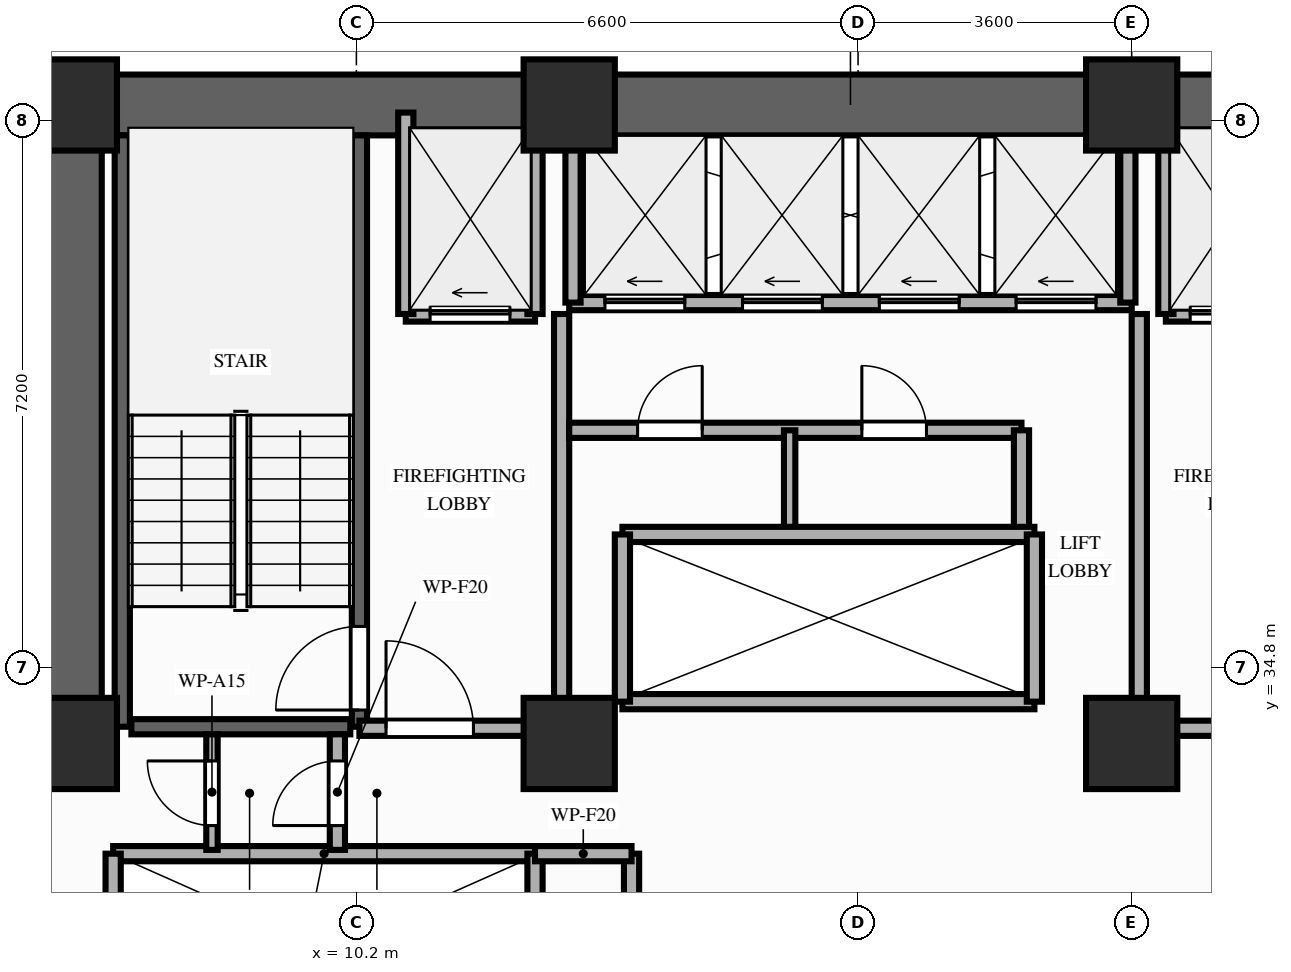
"""IFC4 building model, lengths in metres.
Left out: names, types, materials, properties, quantities, classifications, styles, units other than length and angle.
Written with IfcOpenShell. Run it as: python <this file> out.ifc"""

import sys

from ifc_helpers import new_model, si_unit, direction, frame, frame_2d, origin, origin_2d, place, context, subcontext, project, spatial, rectangle, extrude, element, fill, save


model = new_model("IFC4")
c1 = context("Model", 3, precision=1e-05, world=origin(), true_north=direction((0.0, 1.0)))
c2 = subcontext(c1, "Body", "Model", "MODEL_VIEW")
j1 = project(units=[si_unit("LENGTHUNIT", "METRE"), si_unit("PLANEANGLEUNIT", "RADIAN")], contexts=[c1])
p1 = place(None, origin())
s1 = spatial("IfcSite", under=j1, at=p1, CompositionType="ELEMENT")
p2 = place(p1, origin())
s2 = spatial("IfcBuilding", under=s1, at=p2, CompositionType="ELEMENT")
p3 = place(p2, frame((0.0, 0.0, 43.6)))
s3 = spatial("IfcBuildingStorey", under=s2, at=p3, CompositionType="ELEMENT", Elevation=43.6)
for number, where, z_axis, x_axis in (
    (1, (6.45, 33.8, 0.0), (0.0, 0.0, 1.0), (1.0, 0.0, 0.0)),
    (2, (13.0, 33.8, 0.0), (0.0, 0.0, 1.0), (1.0, 0.0, 0.0)),
    (3, (20.4, 33.8, 0.0), (0.0, 0.0, 1.0), (1.0, 0.0, 0.0)),
    (4, (6.45, 42.2, 0.0), (0.0, 0.0, 1.0), (1.0, 0.0, 0.0)),
    (5, (13.0, 42.2, 0.0), (0.0, 0.0, 1.0), (1.0, 0.0, 0.0)),
    (6, (20.4, 42.2, 0.0), (0.0, 0.0, 1.0), (1.0, 0.0, 0.0)),
):
    element("IfcColumn", number, at=place(p3, frame(where, z_axis=z_axis, x_axis=x_axis)), inside=s3, PredefinedType="COLUMN", context=c2, shape_type="SweptSolid", body=[
        extrude(rectangle(XDim=1.2, YDim=1.2, at=origin_2d()), origin(), (0.0, 0.0, 1.0), 3.2),
    ])
p4 = place(p3, frame((6.45, 42.2, 0.0), z_axis=(0.0, 0.0, 1.0), x_axis=(1.0, 0.0, 0.0)))
e7 = element("IfcWall", 7, at=p4, inside=s3, PredefinedType="SHEAR", context=c2, shape_type="SweptSolid", body=[
    extrude(rectangle(XDim=20.45, YDim=0.8, at=frame_2d((10.225, 0.0))), origin(), (0.0, 0.0, 1.0), 3.02),
])
p5 = place(p3, frame((6.45, 33.8, 0.0), z_axis=(0.0, 0.0, 1.0), x_axis=(0.0, 1.0, 0.0)))
e8 = element("IfcWall", 8, at=p5, inside=s3, PredefinedType="SHEAR", context=c2, shape_type="SweptSolid", body=[
    extrude(rectangle(XDim=7.95, YDim=0.8, at=frame_2d((3.975, 0.0))), origin(), (0.0, 0.0, 1.0), 3.02),
])
p6 = place(p3, frame((7.12, 34.02, 0.0), z_axis=(0.0, 0.0, 1.0), x_axis=(0.0, 1.0, 0.0)))
e9 = element("IfcWall", 9, at=p6, inside=s3, PredefinedType="SHEAR", context=c2, shape_type="SweptSolid", body=[
    extrude(rectangle(XDim=7.78, YDim=0.2, at=frame_2d((3.89, 0.0))), origin(), (0.0, 0.0, 1.0), 3.02),
])
p7 = place(p3, frame((10.24, 34.02, 0.0), z_axis=(0.0, 0.0, 1.0), x_axis=(0.0, 1.0, 0.0)))
e10 = element("IfcWall", 10, at=p7, inside=s3, PredefinedType="SHEAR", context=c2, shape_type="SweptSolid", body=[
    extrude(rectangle(XDim=7.78, YDim=0.2, at=frame_2d((3.89, 0.0))), origin(), (0.0, 0.0, 1.0), 3.02),
])
p8 = place(p7, frame((0.22, 0.0, 0.0)))
e11 = element("IfcOpeningElement", 11, at=p8, cuts=e10, PredefinedType="OPENING", context=c2, shape_type="SweptSolid", body=[
    extrude(rectangle(XDim=1.1, YDim=2.15, at=frame_2d((0.55, 1.075))), frame((0.0, 0.11, 0.0), z_axis=(0.0, -1.0, 0.0), x_axis=(1.0, 0.0, 0.0)), (0.0, 0.0, 1.0), 0.22),
])
p9 = place(p3, frame((7.24, 34.02, 0.0), z_axis=(0.0, 0.0, 1.0), x_axis=(1.0, 0.0, 0.0)))
e12 = element("IfcWall", 12, at=p9, inside=s3, PredefinedType="SHEAR", context=c2, shape_type="SweptSolid", body=[
    extrude(rectangle(XDim=2.88, YDim=0.2, at=frame_2d((1.44, 0.0))), origin(), (0.0, 0.0, 1.0), 3.02),
])
p10 = place(p3, frame((7.0, 32.35, 0.0), z_axis=(0.0, 0.0, 1.0), x_axis=(1.0, 0.0, 0.0)))
e13 = element("IfcWall", 13, at=p10, inside=s3, PredefinedType="MOVABLE", context=c2, shape_type="SweptSolid", body=[
    extrude(rectangle(XDim=5.55, YDim=0.2, at=frame_2d((2.775, 0.0))), origin(), (0.0, 0.0, 1.0), 3.02),
])
for number, where, z_axis, x_axis in (
    (14, (7.0, 29.85, 0.0), (0.0, 0.0, 1.0), (0.0, 1.0, 0.0)),
    (15, (12.55, 29.85, 0.0), (0.0, 0.0, 1.0), (0.0, 1.0, 0.0)),
):
    element("IfcWall", number, at=place(p3, frame(where, z_axis=z_axis, x_axis=x_axis)), inside=s3, PredefinedType="MOVABLE", context=c2, shape_type="SweptSolid", body=[
        extrude(rectangle(XDim=2.5, YDim=0.2, at=frame_2d((1.25, 0.0))), origin(), (0.0, 0.0, 1.0), 3.02),
    ])
p11 = place(p3, frame((10.85, 39.45, 0.0), z_axis=(0.0, 0.0, 1.0), x_axis=(1.0, 0.0, 0.0)))
e16 = element("IfcWall", 16, at=p11, inside=s3, PredefinedType="MOVABLE", context=c2, shape_type="SweptSolid", body=[
    extrude(rectangle(XDim=1.7, YDim=0.2, at=frame_2d((0.85, 0.0))), origin(), (0.0, 0.0, 1.0), 3.02),
])
p12 = place(p11, frame((0.32, 0.0, 0.0)))
e17 = element("IfcOpeningElement", 17, at=p12, cuts=e16, PredefinedType="OPENING", context=c2, shape_type="SweptSolid", body=[
    extrude(rectangle(XDim=1.05, YDim=2.15, at=frame_2d((0.525, 1.075))), frame((0.0, 0.11, 0.0), z_axis=(0.0, -1.0, 0.0), x_axis=(1.0, 0.0, 0.0)), (0.0, 0.0, 1.0), 0.22),
])
p13 = place(p3, frame((20.85, 39.45, 0.0), z_axis=(0.0, 0.0, 1.0), x_axis=(1.0, 0.0, 0.0)))
e18 = element("IfcWall", 18, at=p13, inside=s3, PredefinedType="MOVABLE", context=c2, shape_type="SweptSolid", body=[
    extrude(rectangle(XDim=1.7, YDim=0.2, at=frame_2d((0.85, 0.0))), origin(), (0.0, 0.0, 1.0), 3.02),
])
p14 = place(p13, frame((0.32, 0.0, 0.0)))
e19 = element("IfcOpeningElement", 19, at=p14, cuts=e18, PredefinedType="OPENING", context=c2, shape_type="SweptSolid", body=[
    extrude(rectangle(XDim=1.05, YDim=2.15, at=frame_2d((0.525, 1.075))), frame((0.0, 0.11, 0.0), z_axis=(0.0, -1.0, 0.0), x_axis=(1.0, 0.0, 0.0)), (0.0, 0.0, 1.0), 0.22),
])
for number, where, z_axis, x_axis in (
    (20, (10.85, 39.45, 0.0), (0.0, 0.0, 1.0), (0.0, 1.0, 0.0)),
    (21, (12.55, 39.45, 0.0), (0.0, 0.0, 1.0), (0.0, 1.0, 0.0)),
):
    element("IfcWall", number, at=place(p3, frame(where, z_axis=z_axis, x_axis=x_axis)), inside=s3, PredefinedType="MOVABLE", context=c2, shape_type="SweptSolid", body=[
        extrude(rectangle(XDim=2.65, YDim=0.2, at=frame_2d((1.325, 0.0))), origin(), (0.0, 0.0, 1.0), 2.41),
    ])
p15 = place(p3, frame((12.9, 34.0, 0.0), z_axis=(0.0, 0.0, 1.0), x_axis=(0.0, 1.0, 0.0)))
e22 = element("IfcWall", 22, at=p15, inside=s3, PredefinedType="PARTITIONING", context=c2, shape_type="SweptSolid", body=[
    extrude(rectangle(XDim=5.45, YDim=0.2, at=frame_2d((2.725, 0.0))), origin(), (0.0, 0.0, 1.0), 2.41),
])
p16 = place(p3, frame((10.24, 34.0, 0.0), z_axis=(0.0, 0.0, 1.0), x_axis=(1.0, 0.0, 0.0)))
e23 = element("IfcWall", 23, at=p16, inside=s3, PredefinedType="PARTITIONING", context=c2, shape_type="SweptSolid", body=[
    extrude(rectangle(XDim=2.66, YDim=0.2, at=frame_2d((1.33, 0.0))), origin(), (0.0, 0.0, 1.0), 2.41),
])
p17 = place(p16, frame((0.35, 0.0, 0.0)))
e24 = element("IfcOpeningElement", 24, at=p17, cuts=e23, PredefinedType="OPENING", context=c2, shape_type="SweptSolid", body=[
    extrude(rectangle(XDim=1.15, YDim=2.15, at=frame_2d((0.575, 1.075))), frame((0.0, 0.11, 0.0), z_axis=(0.0, -1.0, 0.0), x_axis=(1.0, 0.0, 0.0)), (0.0, 0.0, 1.0), 0.22),
])
p18 = place(p3, frame((20.85, 39.45, 0.0), z_axis=(0.0, 0.0, 1.0), x_axis=(0.0, 1.0, 0.0)))
e25 = element("IfcWall", 25, at=p18, inside=s3, PredefinedType="MOVABLE", context=c2, shape_type="SweptSolid", body=[
    extrude(rectangle(XDim=2.65, YDim=0.2, at=frame_2d((1.325, 0.0))), origin(), (0.0, 0.0, 1.0), 2.41),
])
p19 = place(p3, frame((20.5, 34.0, 0.0), z_axis=(0.0, 0.0, 1.0), x_axis=(0.0, 1.0, 0.0)))
e26 = element("IfcWall", 26, at=p19, inside=s3, PredefinedType="PARTITIONING", context=c2, shape_type="SweptSolid", body=[
    extrude(rectangle(XDim=5.45, YDim=0.2, at=frame_2d((2.725, 0.0))), origin(), (0.0, 0.0, 1.0), 2.41),
])
p20 = place(p3, frame((20.5, 34.0, 0.0), z_axis=(0.0, 0.0, 1.0), x_axis=(1.0, 0.0, 0.0)))
e27 = element("IfcWall", 27, at=p20, inside=s3, PredefinedType="PARTITIONING", context=c2, shape_type="SweptSolid", body=[
    extrude(rectangle(XDim=2.6, YDim=0.2, at=frame_2d((1.3, 0.0))), origin(), (0.0, 0.0, 1.0), 2.41),
])
p21 = place(p20, frame((1.05, 0.0, 0.0)))
e28 = element("IfcOpeningElement", 28, at=p21, cuts=e27, PredefinedType="OPENING", context=c2, shape_type="SweptSolid", body=[
    extrude(rectangle(XDim=1.15, YDim=2.15, at=frame_2d((0.575, 1.075))), frame((0.0, 0.11, 0.0), z_axis=(0.0, -1.0, 0.0), x_axis=(1.0, 0.0, 0.0)), (0.0, 0.0, 1.0), 0.22),
])
p22 = place(p3, frame((9.95, 32.4, 0.0), z_axis=(0.0, 0.0, 1.0), x_axis=(0.0, 1.0, 0.0)))
e29 = element("IfcWall", 29, at=p22, inside=s3, PredefinedType="PARTITIONING", context=c2, shape_type="SweptSolid", body=[
    extrude(rectangle(XDim=1.52, YDim=0.2, at=frame_2d((0.76, 0.0))), origin(), (0.0, 0.0, 1.0), 2.41),
])
p23 = place(p22, frame((0.32, 0.0, 0.0)))
e30 = element("IfcOpeningElement", 30, at=p23, cuts=e29, PredefinedType="OPENING", context=c2, shape_type="SweptSolid", body=[
    extrude(rectangle(XDim=0.85, YDim=2.05, at=frame_2d((0.425, 1.025))), frame((0.0, 0.11, 0.0), z_axis=(0.0, -1.0, 0.0), x_axis=(1.0, 0.0, 0.0)), (0.0, 0.0, 1.0), 0.22),
])
p24 = place(p3, frame((8.3, 32.4, 0.0), z_axis=(0.0, 0.0, 1.0), x_axis=(0.0, 1.0, 0.0)))
e31 = element("IfcWall", 31, at=p24, inside=s3, PredefinedType="PARTITIONING", context=c2, shape_type="SweptSolid", body=[
    extrude(rectangle(XDim=1.52, YDim=0.15, at=frame_2d((0.76, 0.0))), origin(), (0.0, 0.0, 1.0), 2.41),
])
p25 = place(p24, frame((0.32, 0.0, 0.0)))
e32 = element("IfcOpeningElement", 32, at=p25, cuts=e31, PredefinedType="OPENING", context=c2, shape_type="SweptSolid", body=[
    extrude(rectangle(XDim=0.85, YDim=2.05, at=frame_2d((0.425, 1.025))), frame((0.0, 0.085, 0.0), z_axis=(0.0, -1.0, 0.0), x_axis=(1.0, 0.0, 0.0)), (0.0, 0.0, 1.0), 0.17),
])
p26 = place(p3, frame((13.82, 29.85, 0.0), z_axis=(0.0, 0.0, 1.0), x_axis=(0.0, 1.0, 0.0)))
e33 = element("IfcWall", 33, at=p26, inside=s3, PredefinedType="PARTITIONING", context=c2, shape_type="SweptSolid", body=[
    extrude(rectangle(XDim=2.5, YDim=0.2, at=frame_2d((1.25, 0.0))), origin(), (0.0, 0.0, 1.0), 3.02),
])
p27 = place(p3, frame((12.55, 32.35, 0.0), z_axis=(0.0, 0.0, 1.0), x_axis=(1.0, 0.0, 0.0)))
e34 = element("IfcWall", 34, at=p27, inside=s3, PredefinedType="PARTITIONING", context=c2, shape_type="SweptSolid", body=[
    extrude(rectangle(XDim=1.27, YDim=0.2, at=frame_2d((0.635, 0.0))), origin(), (0.0, 0.0, 1.0), 3.02),
])
p28 = place(p3, frame((13.0, 39.6, 0.0), z_axis=(0.0, 0.0, 1.0), x_axis=(1.0, 0.0, 0.0)))
e35 = element("IfcWall", 35, at=p28, inside=s3, PredefinedType="MOVABLE", context=c2, shape_type="SweptSolid", body=[
    extrude(rectangle(XDim=7.4, YDim=0.2, at=frame_2d((3.7, 0.0))), origin(), (0.0, 0.0, 1.0), 3.02),
])
p29 = place(p28, frame((0.47, 0.0, 0.0)))
e36 = element("IfcOpeningElement", 36, at=p29, cuts=e35, PredefinedType="OPENING", context=c2, shape_type="SweptSolid", body=[
    extrude(rectangle(XDim=1.05, YDim=2.15, at=frame_2d((0.525, 1.075))), frame((0.0, 0.11, 0.0), z_axis=(0.0, -1.0, 0.0), x_axis=(1.0, 0.0, 0.0)), (0.0, 0.0, 1.0), 0.22),
])
p30 = place(p28, frame((2.28, 0.0, 0.0)))
e37 = element("IfcOpeningElement", 37, at=p30, cuts=e35, PredefinedType="OPENING", context=c2, shape_type="SweptSolid", body=[
    extrude(rectangle(XDim=1.05, YDim=2.15, at=frame_2d((0.525, 1.075))), frame((0.0, 0.11, 0.0), z_axis=(0.0, -1.0, 0.0), x_axis=(1.0, 0.0, 0.0)), (0.0, 0.0, 1.0), 0.22),
])
p31 = place(p28, frame((4.08, 0.0, 0.0)))
e38 = element("IfcOpeningElement", 38, at=p31, cuts=e35, PredefinedType="OPENING", context=c2, shape_type="SweptSolid", body=[
    extrude(rectangle(XDim=1.05, YDim=2.15, at=frame_2d((0.525, 1.075))), frame((0.0, 0.11, 0.0), z_axis=(0.0, -1.0, 0.0), x_axis=(1.0, 0.0, 0.0)), (0.0, 0.0, 1.0), 0.22),
])
p32 = place(p28, frame((5.88, 0.0, 0.0)))
e39 = element("IfcOpeningElement", 39, at=p32, cuts=e35, PredefinedType="OPENING", context=c2, shape_type="SweptSolid", body=[
    extrude(rectangle(XDim=1.05, YDim=2.15, at=frame_2d((0.525, 1.075))), frame((0.0, 0.11, 0.0), z_axis=(0.0, -1.0, 0.0), x_axis=(1.0, 0.0, 0.0)), (0.0, 0.0, 1.0), 0.22),
])
for number, where, z_axis, x_axis in (
    (40, (13.05, 39.6, 0.0), (0.0, 0.0, 1.0), (0.0, 1.0, 0.0)),
    (41, (20.35, 39.6, 0.0), (0.0, 0.0, 1.0), (0.0, 1.0, 0.0)),
):
    element("IfcWall", number, at=place(p3, frame(where, z_axis=z_axis, x_axis=x_axis)), inside=s3, PredefinedType="MOVABLE", context=c2, shape_type="SweptSolid", body=[
        extrude(rectangle(XDim=2.18, YDim=0.2, at=frame_2d((1.09, 0.0))), origin(), (0.0, 0.0, 1.0), 3.02),
    ])
p33 = place(p3, frame((13.0, 37.92, 0.0), z_axis=(0.0, 0.0, 1.0), x_axis=(1.0, 0.0, 0.0)))
e42 = element("IfcWall", 42, at=p33, inside=s3, PredefinedType="PARTITIONING", context=c2, shape_type="SweptSolid", body=[
    extrude(rectangle(XDim=5.95, YDim=0.2, at=frame_2d((2.975, 0.0))), origin(), (0.0, 0.0, 1.0), 3.02),
])
p34 = place(p33, frame((0.9, 0.0, 0.0)))
e43 = element("IfcOpeningElement", 43, at=p34, cuts=e42, PredefinedType="OPENING", context=c2, shape_type="SweptSolid", body=[
    extrude(rectangle(XDim=0.85, YDim=2.05, at=frame_2d((0.425, 1.025))), frame((0.0, 0.11, 0.0), z_axis=(0.0, -1.0, 0.0), x_axis=(1.0, 0.0, 0.0)), (0.0, 0.0, 1.0), 0.22),
])
p35 = place(p33, frame((3.85, 0.0, 0.0)))
e44 = element("IfcOpeningElement", 44, at=p35, cuts=e42, PredefinedType="OPENING", context=c2, shape_type="SweptSolid", body=[
    extrude(rectangle(XDim=0.85, YDim=2.05, at=frame_2d((0.425, 1.025))), frame((0.0, 0.11, 0.0), z_axis=(0.0, -1.0, 0.0), x_axis=(1.0, 0.0, 0.0)), (0.0, 0.0, 1.0), 0.22),
])
p36 = place(p3, frame((18.95, 36.6, 0.0), z_axis=(0.0, 0.0, 1.0), x_axis=(0.0, 1.0, 0.0)))
e45 = element("IfcWall", 45, at=p36, inside=s3, PredefinedType="PARTITIONING", context=c2, shape_type="SweptSolid", body=[
    extrude(rectangle(XDim=1.32, YDim=0.2, at=frame_2d((0.66, 0.0))), origin(), (0.0, 0.0, 1.0), 3.02),
])
p37 = place(p3, frame((15.9, 36.6, 0.0), z_axis=(0.0, 0.0, 1.0), x_axis=(0.0, 1.0, 0.0)))
e46 = element("IfcWall", 46, at=p37, inside=s3, PredefinedType="PARTITIONING", context=c2, shape_type="SweptSolid", body=[
    extrude(rectangle(XDim=1.32, YDim=0.15, at=frame_2d((0.66, 0.0))), origin(), (0.0, 0.0, 1.0), 3.02),
])
for number, where, z_axis, x_axis in (
    (47, (13.7, 34.35, 0.0), (0.0, 0.0, 1.0), (1.0, 0.0, 0.0)),
    (48, (13.7, 36.55, 0.0), (0.0, 0.0, 1.0), (1.0, 0.0, 0.0)),
):
    element("IfcWall", number, at=place(p3, frame(where, z_axis=z_axis, x_axis=x_axis)), inside=s3, PredefinedType="MOVABLE", context=c2, shape_type="SweptSolid", body=[
        extrude(rectangle(XDim=5.42, YDim=0.2, at=frame_2d((2.71, 0.0))), origin(), (0.0, 0.0, 1.0), 3.02),
    ])
for number, where, z_axis, x_axis in (
    (49, (13.7, 34.35, 0.0), (0.0, 0.0, 1.0), (0.0, 1.0, 0.0)),
    (50, (19.12, 34.35, 0.0), (0.0, 0.0, 1.0), (0.0, 1.0, 0.0)),
):
    element("IfcWall", number, at=place(p3, frame(where, z_axis=z_axis, x_axis=x_axis)), inside=s3, PredefinedType="MOVABLE", context=c2, shape_type="SweptSolid", body=[
        extrude(rectangle(XDim=2.2, YDim=0.2, at=frame_2d((1.1, 0.0))), origin(), (0.0, 0.0, 1.0), 3.02),
    ])
p38 = place(p8, origin())
e51 = element("IfcDoor", 51, at=p38, inside=s3, OperationType="SINGLE_SWING_LEFT", PredefinedType="DOOR", context=c2, shape_type="SweptSolid", body=[
    extrude(rectangle(XDim=1.1, YDim=2.15, at=frame_2d((0.55, 1.075))), frame((0.0, 0.025, 0.0), z_axis=(0.0, -1.0, 0.0), x_axis=(1.0, 0.0, 0.0)), (0.0, 0.0, 1.0), 0.05),
])
fill(e11, e51)
p39 = place(p12, origin())
e52 = element("IfcDoor", 52, at=p39, inside=s3, OperationType="SLIDING_TO_LEFT", PredefinedType="DOOR", context=c2, shape_type="SweptSolid", body=[
    extrude(rectangle(XDim=1.05, YDim=2.15, at=frame_2d((0.525, 1.075))), frame((0.0, 0.025, 0.0), z_axis=(0.0, -1.0, 0.0), x_axis=(1.0, 0.0, 0.0)), (0.0, 0.0, 1.0), 0.05),
])
fill(e17, e52)
p40 = place(p14, origin())
e53 = element("IfcDoor", 53, at=p40, inside=s3, OperationType="SLIDING_TO_LEFT", PredefinedType="DOOR", context=c2, shape_type="SweptSolid", body=[
    extrude(rectangle(XDim=1.05, YDim=2.15, at=frame_2d((0.525, 1.075))), frame((0.0, 0.025, 0.0), z_axis=(0.0, -1.0, 0.0), x_axis=(1.0, 0.0, 0.0)), (0.0, 0.0, 1.0), 0.05),
])
fill(e19, e53)
p41 = place(p17, origin())
e54 = element("IfcDoor", 54, at=p41, inside=s3, OperationType="SINGLE_SWING_LEFT", PredefinedType="DOOR", context=c2, shape_type="SweptSolid", body=[
    extrude(rectangle(XDim=1.15, YDim=2.15, at=frame_2d((0.575, 1.075))), frame((0.0, 0.025, 0.0), z_axis=(0.0, -1.0, 0.0), x_axis=(1.0, 0.0, 0.0)), (0.0, 0.0, 1.0), 0.05),
])
fill(e24, e54)
p42 = place(p23, origin())
e55 = element("IfcDoor", 55, at=p42, inside=s3, OperationType="SINGLE_SWING_LEFT", PredefinedType="DOOR", context=c2, shape_type="SweptSolid", body=[
    extrude(rectangle(XDim=0.85, YDim=2.05, at=frame_2d((0.425, 1.025))), frame((0.0, 0.025, 0.0), z_axis=(0.0, -1.0, 0.0), x_axis=(1.0, 0.0, 0.0)), (0.0, 0.0, 1.0), 0.05),
])
fill(e30, e55)
p43 = place(p25, origin())
e56 = element("IfcDoor", 56, at=p43, inside=s3, OperationType="SINGLE_SWING_RIGHT", PredefinedType="DOOR", context=c2, shape_type="SweptSolid", body=[
    extrude(rectangle(XDim=0.85, YDim=2.05, at=frame_2d((0.425, 1.025))), frame((0.0, 0.025, 0.0), z_axis=(0.0, -1.0, 0.0), x_axis=(1.0, 0.0, 0.0)), (0.0, 0.0, 1.0), 0.05),
])
fill(e32, e56)
p44 = place(p29, origin())
e57 = element("IfcDoor", 57, at=p44, inside=s3, OperationType="SLIDING_TO_LEFT", PredefinedType="DOOR", context=c2, shape_type="SweptSolid", body=[
    extrude(rectangle(XDim=1.05, YDim=2.15, at=frame_2d((0.525, 1.075))), frame((0.0, 0.025, 0.0), z_axis=(0.0, -1.0, 0.0), x_axis=(1.0, 0.0, 0.0)), (0.0, 0.0, 1.0), 0.05),
])
fill(e36, e57)
p45 = place(p30, origin())
e58 = element("IfcDoor", 58, at=p45, inside=s3, OperationType="SLIDING_TO_LEFT", PredefinedType="DOOR", context=c2, shape_type="SweptSolid", body=[
    extrude(rectangle(XDim=1.05, YDim=2.15, at=frame_2d((0.525, 1.075))), frame((0.0, 0.025, 0.0), z_axis=(0.0, -1.0, 0.0), x_axis=(1.0, 0.0, 0.0)), (0.0, 0.0, 1.0), 0.05),
])
fill(e37, e58)
p46 = place(p31, origin())
e59 = element("IfcDoor", 59, at=p46, inside=s3, OperationType="SLIDING_TO_LEFT", PredefinedType="DOOR", context=c2, shape_type="SweptSolid", body=[
    extrude(rectangle(XDim=1.05, YDim=2.15, at=frame_2d((0.525, 1.075))), frame((0.0, 0.025, 0.0), z_axis=(0.0, -1.0, 0.0), x_axis=(1.0, 0.0, 0.0)), (0.0, 0.0, 1.0), 0.05),
])
fill(e38, e59)
p47 = place(p32, origin())
e60 = element("IfcDoor", 60, at=p47, inside=s3, OperationType="SLIDING_TO_LEFT", PredefinedType="DOOR", context=c2, shape_type="SweptSolid", body=[
    extrude(rectangle(XDim=1.05, YDim=2.15, at=frame_2d((0.525, 1.075))), frame((0.0, 0.025, 0.0), z_axis=(0.0, -1.0, 0.0), x_axis=(1.0, 0.0, 0.0)), (0.0, 0.0, 1.0), 0.05),
])
fill(e39, e60)
p48 = place(p34, origin())
e61 = element("IfcDoor", 61, at=p48, inside=s3, OperationType="SINGLE_SWING_RIGHT", PredefinedType="DOOR", context=c2, shape_type="SweptSolid", body=[
    extrude(rectangle(XDim=0.85, YDim=2.05, at=frame_2d((0.425, 1.025))), frame((0.0, 0.025, 0.0), z_axis=(0.0, -1.0, 0.0), x_axis=(1.0, 0.0, 0.0)), (0.0, 0.0, 1.0), 0.05),
])
fill(e43, e61)
p49 = place(p35, origin())
e62 = element("IfcDoor", 62, at=p49, inside=s3, OperationType="SINGLE_SWING_LEFT", PredefinedType="DOOR", context=c2, shape_type="SweptSolid", body=[
    extrude(rectangle(XDim=0.85, YDim=2.05, at=frame_2d((0.425, 1.025))), frame((0.0, 0.025, 0.0), z_axis=(0.0, -1.0, 0.0), x_axis=(1.0, 0.0, 0.0)), (0.0, 0.0, 1.0), 0.05),
])
fill(e44, e62)
save(model, sys.argv[1])
